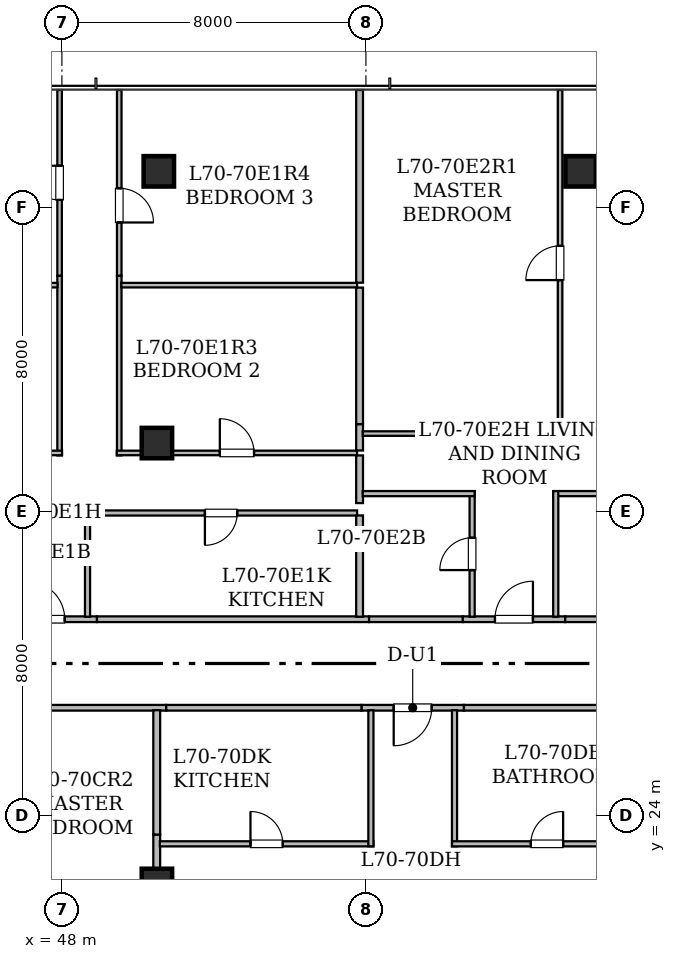
"""IFC4 building model, lengths in metres.
Left out: names, types, materials, properties, quantities, classifications, styles, units other than length and angle.
Written with IfcOpenShell. Run it as: python <this file> out.ifc"""

import sys

from ifc_helpers import new_model, si_unit, direction, frame, frame_2d, origin, origin_2d, place, context, subcontext, project, spatial, rectangle, hollow_rectangle, extrude, element, fill, save


model = new_model("IFC4")
c1 = context("Model", 3, precision=1e-05, world=origin(), true_north=direction((0.0, 1.0)))
c2 = subcontext(c1, "Body", "Model", "MODEL_VIEW")
j1 = project(units=[si_unit("LENGTHUNIT", "METRE"), si_unit("PLANEANGLEUNIT", "RADIAN")], contexts=[c1])
p1 = place(None, origin())
s1 = spatial("IfcSite", under=j1, at=p1, CompositionType="ELEMENT")
p2 = place(p1, origin())
s2 = spatial("IfcBuilding", under=s1, at=p2, CompositionType="ELEMENT")
p3 = place(p2, frame((0.0, 0.0, 273.65)))
s3 = spatial("IfcBuildingStorey", under=s2, at=p3, CompositionType="ELEMENT", Elevation=273.65)
for number, where, z_axis, x_axis in (
    (1, (50.55, 40.95, 0.0), (0.0, 0.0, 1.0), (1.0, 0.0, 0.0)),
    (2, (61.65, 40.95, 0.0), (0.0, 0.0, 1.0), (1.0, 0.0, 0.0)),
):
    element("IfcColumn", number, at=place(p3, frame(where, z_axis=z_axis, x_axis=x_axis)), inside=s3, PredefinedType="COLUMN", context=c2, shape_type="SweptSolid", body=[
        extrude(hollow_rectangle(XDim=0.8, YDim=0.8, WallThickness=0.04, at=origin_2d()), origin(), (0.0, 0.0, 1.0), 4.175),
    ])
for number, where, z_axis, x_axis in (
    (3, (50.5, 22.2, 0.0), (0.0, 0.0, 1.0), (1.0, 0.0, 0.0)),
    (4, (50.5, 33.8, 0.0), (0.0, 0.0, 1.0), (1.0, 0.0, 0.0)),
):
    element("IfcColumn", number, at=place(p3, frame(where, z_axis=z_axis, x_axis=x_axis)), inside=s3, PredefinedType="COLUMN", context=c2, shape_type="SweptSolid", body=[
        extrude(hollow_rectangle(XDim=0.8, YDim=0.8, WallThickness=0.04, at=origin_2d()), origin(), (0.0, 0.0, 1.0), 4.2),
    ])
p4 = place(p3, frame((50.744, 26.835, 0.0), z_axis=(0.0, 0.0, 1.0), x_axis=(-1.0, 0.0, 0.0)))
e5 = element("IfcWall", 5, at=p4, inside=s3, PredefinedType="STANDARD", context=c2, shape_type="SweptSolid", body=[
    extrude(rectangle(XDim=4.77, YDim=0.15, at=frame_2d((2.385, 0.0))), origin(), (0.0, 0.0, 1.0), 2.22),
])
p5 = place(p3, frame((58.58, 26.835, 0.0), z_axis=(0.0, 0.0, 1.0), x_axis=(-1.0, 0.0, 0.0)))
e6 = element("IfcWall", 6, at=p5, inside=s3, PredefinedType="STANDARD", context=c2, shape_type="SweptSolid", body=[
    extrude(rectangle(XDim=2.698, YDim=0.15, at=frame_2d((1.349, 0.0))), origin(), (0.0, 0.0, 1.0), 3.78),
])
p6 = place(p5, frame((0.849, 0.0, 0.0)))
e7 = element("IfcOpeningElement", 7, at=p6, cuts=e6, PredefinedType="OPENING", context=c2, shape_type="SweptSolid", body=[
    extrude(rectangle(XDim=1.0, YDim=2.15, at=frame_2d((0.5, 1.075))), frame((0.0, 0.085, 0.0), z_axis=(0.0, -1.0, 0.0), x_axis=(1.0, 0.0, 0.0)), (0.0, 0.0, 1.0), 0.17),
])
p7 = place(p3, frame((62.947, 26.835, 0.0), z_axis=(0.0, 0.0, 1.0), x_axis=(-1.0, 0.0, 0.0)))
e8 = element("IfcWall", 8, at=p7, inside=s3, PredefinedType="STANDARD", context=c2, shape_type="SweptSolid", body=[
    extrude(rectangle(XDim=4.367, YDim=0.15, at=frame_2d((2.184, 0.0))), origin(), (0.0, 0.0, 1.0), 3.78),
])
p8 = place(p3, frame((55.882, 26.835, 0.0), z_axis=(0.0, 0.0, 1.0), x_axis=(-1.0, 0.0, 0.0)))
e9 = element("IfcWall", 9, at=p8, inside=s3, PredefinedType="STANDARD", context=c2, shape_type="SweptSolid", body=[
    extrude(rectangle(XDim=5.138, YDim=0.15, at=frame_2d((2.569, 0.0))), origin(), (0.0, 0.0, 1.0), 2.22),
])
p9 = place(p3, frame((46.225, 29.165, 0.0), z_axis=(0.0, 0.0, 1.0), x_axis=(1.0, 0.0, 0.0)))
e10 = element("IfcWall", 10, at=p9, inside=s3, PredefinedType="STANDARD", context=c2, shape_type="SweptSolid", body=[
    extrude(rectangle(XDim=2.698, YDim=0.15, at=frame_2d((1.349, 0.0))), origin(), (0.0, 0.0, 1.0), 3.78),
])
p10 = place(p9, frame((0.849, 0.0, 0.0)))
e11 = element("IfcOpeningElement", 11, at=p10, cuts=e10, PredefinedType="OPENING", context=c2, shape_type="SweptSolid", body=[
    extrude(rectangle(XDim=1.0, YDim=2.15, at=frame_2d((0.5, 1.075))), frame((0.0, 0.085, 0.0), z_axis=(0.0, -1.0, 0.0), x_axis=(1.0, 0.0, 0.0)), (0.0, 0.0, 1.0), 0.17),
])
p11 = place(p3, frame((48.923, 29.165, 0.0), z_axis=(0.0, 0.0, 1.0), x_axis=(1.0, 0.0, 0.0)))
e12 = element("IfcWall", 12, at=p11, inside=s3, PredefinedType="STANDARD", context=c2, shape_type="SweptSolid", body=[
    extrude(rectangle(XDim=7.16, YDim=0.15, at=frame_2d((3.58, 0.0))), origin(), (0.0, 0.0, 1.0), 2.22),
])
p12 = place(p3, frame((58.546, 29.165, 0.0), z_axis=(0.0, 0.0, 1.0), x_axis=(1.0, 0.0, 0.0)))
e13 = element("IfcWall", 13, at=p12, inside=s3, PredefinedType="STANDARD", context=c2, shape_type="SweptSolid", body=[
    extrude(rectangle(XDim=2.698, YDim=0.15, at=frame_2d((1.349, 0.0))), origin(), (0.0, 0.0, 1.0), 3.78),
])
p13 = place(p12, frame((0.849, 0.0, 0.0)))
e14 = element("IfcOpeningElement", 14, at=p13, cuts=e13, PredefinedType="OPENING", context=c2, shape_type="SweptSolid", body=[
    extrude(rectangle(XDim=1.0, YDim=2.15, at=frame_2d((0.5, 1.075))), frame((0.0, 0.085, 0.0), z_axis=(0.0, -1.0, 0.0), x_axis=(1.0, 0.0, 0.0)), (0.0, 0.0, 1.0), 0.17),
])
p14 = place(p3, frame((56.083, 29.165, 0.0), z_axis=(0.0, 0.0, 1.0), x_axis=(1.0, 0.0, 0.0)))
e15 = element("IfcWall", 15, at=p14, inside=s3, PredefinedType="STANDARD", context=c2, shape_type="SweptSolid", body=[
    extrude(rectangle(XDim=2.463, YDim=0.15, at=frame_2d((1.231, 0.0))), origin(), (0.0, 0.0, 1.0), 3.78),
])
p15 = place(p3, frame((61.244, 29.165, 0.0), z_axis=(0.0, 0.0, 1.0), x_axis=(1.0, 0.0, 0.0)))
e16 = element("IfcWall", 16, at=p15, inside=s3, PredefinedType="STANDARD", context=c2, shape_type="SweptSolid", body=[
    extrude(rectangle(XDim=2.446, YDim=0.15, at=frame_2d((1.223, 0.0))), origin(), (0.0, 0.0, 1.0), 3.78),
])
p16 = place(p3, frame((50.495, 23.499, 0.0), z_axis=(0.0, 0.0, 1.0), x_axis=(0.0, -1.0, 0.0)))
e17 = element("IfcWall", 17, at=p16, inside=s3, PredefinedType="STANDARD", context=c2, shape_type="SweptSolid", body=[
    extrude(rectangle(XDim=1.816, YDim=0.18, at=frame_2d((0.908, 0.0))), origin(), (0.0, 0.0, 1.0), 2.22),
])
p17 = place(p3, frame((50.495, 26.77, 0.0), z_axis=(0.0, 0.0, 1.0), x_axis=(0.0, -1.0, 0.0)))
e18 = element("IfcWall", 18, at=p17, inside=s3, PredefinedType="STANDARD", context=c2, shape_type="SweptSolid", body=[
    extrude(rectangle(XDim=3.271, YDim=0.18, at=frame_2d((1.635, 0.0))), origin(), (0.0, 0.0, 1.0), 2.22),
])
p18 = place(p3, frame((58.331, 26.77, 0.0), z_axis=(0.0, 0.0, 1.0), x_axis=(0.0, -1.0, 0.0)))
e19 = element("IfcWall", 19, at=p18, inside=s3, PredefinedType="PARTITIONING", context=c2, shape_type="SweptSolid", body=[
    extrude(rectangle(XDim=3.58, YDim=0.135, at=frame_2d((1.79, 0.0))), origin(), (0.0, 0.0, 1.0), 3.78),
])
p19 = place(p3, frame((58.266, 23.255, 0.0), z_axis=(0.0, 0.0, 1.0), x_axis=(1.0, 0.0, 0.0)))
e20 = element("IfcWall", 20, at=p19, inside=s3, PredefinedType="PARTITIONING", context=c2, shape_type="SweptSolid", body=[
    extrude(rectangle(XDim=4.995, YDim=0.135, at=frame_2d((2.498, 0.0))), origin(), (0.0, 0.0, 1.0), 3.78),
])
p20 = place(p19, frame((2.073, 0.0, 0.0)))
e21 = element("IfcOpeningElement", 21, at=p20, cuts=e20, PredefinedType="OPENING", context=c2, shape_type="SweptSolid", body=[
    extrude(rectangle(XDim=0.85, YDim=2.1, at=frame_2d((0.425, 1.05))), frame((0.0, 0.077, 0.0), z_axis=(0.0, -1.0, 0.0), x_axis=(1.0, 0.0, 0.0)), (0.0, 0.0, 1.0), 0.155),
])
p21 = place(p3, frame((50.577, 23.255, 0.0), z_axis=(0.0, 0.0, 1.0), x_axis=(1.0, 0.0, 0.0)))
e22 = element("IfcWall", 22, at=p21, inside=s3, PredefinedType="PARTITIONING", context=c2, shape_type="SweptSolid", body=[
    extrude(rectangle(XDim=5.619, YDim=0.135, at=frame_2d((2.81, 0.0))), origin(), (0.0, 0.0, 1.0), 2.22),
])
p22 = place(p21, frame((2.385, 0.0, 0.0)))
e23 = element("IfcOpeningElement", 23, at=p22, cuts=e22, PredefinedType="OPENING", context=c2, shape_type="SweptSolid", body=[
    extrude(rectangle(XDim=0.85, YDim=2.1, at=frame_2d((0.425, 1.05))), frame((0.0, 0.077, 0.0), z_axis=(0.0, -1.0, 0.0), x_axis=(1.0, 0.0, 0.0)), (0.0, 0.0, 1.0), 0.155),
])
p23 = place(p3, frame((56.131, 23.19, 0.0), z_axis=(0.0, 0.0, 1.0), x_axis=(0.0, 1.0, 0.0)))
e24 = element("IfcWall", 24, at=p23, inside=s3, PredefinedType="PARTITIONING", context=c2, shape_type="SweptSolid", body=[
    extrude(rectangle(XDim=3.58, YDim=0.135, at=frame_2d((1.79, 0.0))), origin(), (0.0, 0.0, 1.0), 3.78),
])
p24 = place(p3, frame((55.768, 31.96, 0.0), z_axis=(0.0, 0.0, 1.0), x_axis=(-1.0, 0.0, 0.0)))
e25 = element("IfcWall", 25, at=p24, inside=s3, PredefinedType="PARTITIONING", context=c2, shape_type="SweptSolid", body=[
    extrude(rectangle(XDim=7.159, YDim=0.135, at=frame_2d((3.58, 0.0))), origin(), (0.0, 0.0, 1.0), 2.22),
])
p25 = place(p24, frame((3.155, 0.0, 0.0)))
e26 = element("IfcOpeningElement", 26, at=p25, cuts=e25, PredefinedType="OPENING", context=c2, shape_type="SweptSolid", body=[
    extrude(rectangle(XDim=0.85, YDim=2.1, at=frame_2d((0.425, 1.05))), frame((0.0, 0.077, 0.0), z_axis=(0.0, -1.0, 0.0), x_axis=(1.0, 0.0, 0.0)), (0.0, 0.0, 1.0), 0.155),
])
p26 = place(p3, frame((48.674, 32.025, 0.0), z_axis=(0.0, 0.0, 1.0), x_axis=(0.0, -1.0, 0.0)))
e27 = element("IfcWall", 27, at=p26, inside=s3, PredefinedType="PARTITIONING", context=c2, shape_type="SweptSolid", body=[
    extrude(rectangle(XDim=2.795, YDim=0.135, at=frame_2d((1.397, 0.0))), origin(), (0.0, 0.0, 1.0), 3.78),
])
p27 = place(p3, frame((47.939, 33.475, 0.0), z_axis=(0.0, 0.0, 1.0), x_axis=(0.0, 1.0, 0.0)))
e28 = element("IfcWall", 28, at=p27, inside=s3, PredefinedType="PARTITIONING", context=c2, shape_type="SweptSolid", body=[
    extrude(rectangle(XDim=4.729, YDim=0.12, at=frame_2d((2.365, 0.0))), origin(), (0.0, 0.0, 1.0), 2.22),
])
p28 = place(p3, frame((41.682, 33.54, 0.0), z_axis=(0.0, 0.0, 1.0), x_axis=(1.0, 0.0, 0.0)))
e29 = element("IfcWall", 29, at=p28, inside=s3, PredefinedType="PARTITIONING", context=c2, shape_type="SweptSolid", body=[
    extrude(rectangle(XDim=6.322, YDim=0.12, at=frame_2d((3.161, 0.0))), origin(), (0.0, 0.0, 1.0), 3.78),
])
p29 = place(p28, frame((2.711, 0.0, 0.0)))
e30 = element("IfcOpeningElement", 30, at=p29, cuts=e29, PredefinedType="OPENING", context=c2, shape_type="SweptSolid", body=[
    extrude(rectangle(XDim=0.9, YDim=2.1, at=frame_2d((0.45, 1.05))), frame((0.0, 0.07, 0.0), z_axis=(0.0, -1.0, 0.0), x_axis=(1.0, 0.0, 0.0)), (0.0, 0.0, 1.0), 0.14),
])
p30 = place(p3, frame((47.939, 38.204, 0.0), z_axis=(0.0, 0.0, 1.0), x_axis=(0.0, 1.0, 0.0)))
e31 = element("IfcWall", 31, at=p30, inside=s3, PredefinedType="PARTITIONING", context=c2, shape_type="SweptSolid", body=[
    extrude(rectangle(XDim=4.886, YDim=0.12, at=frame_2d((2.443, 0.0))), origin(), (0.0, 0.0, 1.0), 2.22),
])
p31 = place(p30, frame((1.993, 0.0, 0.0)))
e32 = element("IfcOpeningElement", 32, at=p31, cuts=e31, PredefinedType="OPENING", context=c2, shape_type="SweptSolid", body=[
    extrude(rectangle(XDim=0.9, YDim=2.1, at=frame_2d((0.45, 1.05))), frame((0.0, 0.07, 0.0), z_axis=(0.0, -1.0, 0.0), x_axis=(1.0, 0.0, 0.0)), (0.0, 0.0, 1.0), 0.14),
])
p32 = place(p3, frame((49.509, 38.204, 0.0), z_axis=(0.0, 0.0, 1.0), x_axis=(0.0, -1.0, 0.0)))
e33 = element("IfcWall", 33, at=p32, inside=s3, PredefinedType="PARTITIONING", context=c2, shape_type="SweptSolid", body=[
    extrude(rectangle(XDim=4.729, YDim=0.12, at=frame_2d((2.365, 0.0))), origin(), (0.0, 0.0, 1.0), 2.22),
])
p33 = place(p3, frame((49.444, 33.54, 0.0), z_axis=(0.0, 0.0, 1.0), x_axis=(1.0, 0.0, 0.0)))
e34 = element("IfcWall", 34, at=p33, inside=s3, PredefinedType="PARTITIONING", context=c2, shape_type="SweptSolid", body=[
    extrude(rectangle(XDim=6.324, YDim=0.12, at=frame_2d((3.162, 0.0))), origin(), (0.0, 0.0, 1.0), 2.22),
])
p34 = place(p33, frame((2.712, 0.0, 0.0)))
e35 = element("IfcOpeningElement", 35, at=p34, cuts=e34, PredefinedType="OPENING", context=c2, shape_type="SweptSolid", body=[
    extrude(rectangle(XDim=0.9, YDim=2.1, at=frame_2d((0.45, 1.05))), frame((0.0, 0.07, 0.0), z_axis=(0.0, -1.0, 0.0), x_axis=(1.0, 0.0, 0.0)), (0.0, 0.0, 1.0), 0.14),
])
p35 = place(p3, frame((49.509, 43.09, 0.0), z_axis=(0.0, 0.0, 1.0), x_axis=(0.0, -1.0, 0.0)))
e36 = element("IfcWall", 36, at=p35, inside=s3, PredefinedType="PARTITIONING", context=c2, shape_type="SweptSolid", body=[
    extrude(rectangle(XDim=4.886, YDim=0.12, at=frame_2d((2.443, 0.0))), origin(), (0.0, 0.0, 1.0), 2.22),
])
p36 = place(p35, frame((2.586, 0.0, 0.0)))
e37 = element("IfcOpeningElement", 37, at=p36, cuts=e36, PredefinedType="OPENING", context=c2, shape_type="SweptSolid", body=[
    extrude(rectangle(XDim=0.9, YDim=2.1, at=frame_2d((0.45, 1.05))), frame((0.0, 0.07, 0.0), z_axis=(0.0, -1.0, 0.0), x_axis=(1.0, 0.0, 0.0)), (0.0, 0.0, 1.0), 0.14),
])
p37 = place(p3, frame((55.833, 33.475, 0.0), z_axis=(0.0, 0.0, 1.0), x_axis=(0.0, -1.0, 0.0)))
e38 = element("IfcWall", 38, at=p37, inside=s3, PredefinedType="STANDARD", context=c2, shape_type="SweptSolid", body=[
    extrude(rectangle(XDim=1.254, YDim=0.18, at=frame_2d((0.627, 0.0))), origin(), (0.0, 0.0, 1.0), 2.22),
])
p38 = place(p3, frame((55.833, 31.895, 0.0), z_axis=(0.0, 0.0, 1.0), x_axis=(0.0, -1.0, 0.0)))
e39 = element("IfcWall", 39, at=p38, inside=s3, PredefinedType="STANDARD", context=c2, shape_type="SweptSolid", body=[
    extrude(rectangle(XDim=2.665, YDim=0.18, at=frame_2d((1.333, 0.0))), origin(), (0.0, 0.0, 1.0), 3.78),
])
p39 = place(p3, frame((41.682, 37.955, 0.0), z_axis=(0.0, 0.0, 1.0), x_axis=(1.0, 0.0, 0.0)))
e40 = element("IfcWall", 40, at=p39, inside=s3, PredefinedType="PARTITIONING", context=c2, shape_type="SweptSolid", body=[
    extrude(rectangle(XDim=6.203, YDim=0.12, at=frame_2d((3.102, 0.0))), origin(), (0.0, 0.0, 1.0), 3.78),
])
p40 = place(p3, frame((49.563, 37.955, 0.0), z_axis=(0.0, 0.0, 1.0), x_axis=(1.0, 0.0, 0.0)))
e41 = element("IfcWall", 41, at=p40, inside=s3, PredefinedType="PARTITIONING", context=c2, shape_type="SweptSolid", body=[
    extrude(rectangle(XDim=6.205, YDim=0.12, at=frame_2d((3.103, 0.0))), origin(), (0.0, 0.0, 1.0), 2.22),
])
p41 = place(p3, frame((55.833, 34.299, 0.0), z_axis=(0.0, 0.0, 1.0), x_axis=(0.0, -1.0, 0.0)))
e42 = element("IfcWall", 42, at=p41, inside=s3, PredefinedType="STANDARD", context=c2, shape_type="SweptSolid", body=[
    extrude(rectangle(XDim=0.694, YDim=0.18, at=frame_2d((0.347, 0.0))), origin(), (0.0, 0.0, 1.0), 2.22),
])
p42 = place(p3, frame((55.833, 37.89, 0.0), z_axis=(0.0, 0.0, 1.0), x_axis=(0.0, -1.0, 0.0)))
e43 = element("IfcWall", 43, at=p42, inside=s3, PredefinedType="STANDARD", context=c2, shape_type="SweptSolid", body=[
    extrude(rectangle(XDim=3.591, YDim=0.18, at=frame_2d((1.795, 0.0))), origin(), (0.0, 0.0, 1.0), 2.22),
])
p43 = place(p3, frame((55.833, 43.09, 0.0), z_axis=(0.0, 0.0, 1.0), x_axis=(0.0, -1.0, 0.0)))
e44 = element("IfcWall", 44, at=p43, inside=s3, PredefinedType="STANDARD", context=c2, shape_type="SweptSolid", body=[
    extrude(rectangle(XDim=5.07, YDim=0.18, at=frame_2d((2.535, 0.0))), origin(), (0.0, 0.0, 1.0), 2.22),
])
p44 = place(p3, frame((58.795, 29.23, 0.0), z_axis=(0.0, 0.0, 1.0), x_axis=(0.0, 1.0, 0.0)))
e45 = element("IfcWall", 45, at=p44, inside=s3, PredefinedType="PARTITIONING", context=c2, shape_type="SweptSolid", body=[
    extrude(rectangle(XDim=3.305, YDim=0.135, at=frame_2d((1.652, 0.0))), origin(), (0.0, 0.0, 1.0), 3.78),
])
p45 = place(p44, frame((1.228, 0.0, 0.0)))
e46 = element("IfcOpeningElement", 46, at=p45, cuts=e45, PredefinedType="OPENING", context=c2, shape_type="SweptSolid", body=[
    extrude(rectangle(XDim=0.85, YDim=2.1, at=frame_2d((0.425, 1.05))), frame((0.0, 0.077, 0.0), z_axis=(0.0, -1.0, 0.0), x_axis=(1.0, 0.0, 0.0)), (0.0, 0.0, 1.0), 0.155),
])
p46 = place(p3, frame((58.86, 32.47, 0.0), z_axis=(0.0, 0.0, 1.0), x_axis=(-1.0, 0.0, 0.0)))
e47 = element("IfcWall", 47, at=p46, inside=s3, PredefinedType="PARTITIONING", context=c2, shape_type="SweptSolid", body=[
    extrude(rectangle(XDim=2.945, YDim=0.135, at=frame_2d((1.473, 0.0))), origin(), (0.0, 0.0, 1.0), 3.78),
])
p47 = place(p3, frame((67.808, 32.47, 0.0), z_axis=(0.0, 0.0, 1.0), x_axis=(-1.0, 0.0, 0.0)))
e48 = element("IfcWall", 48, at=p47, inside=s3, PredefinedType="PARTITIONING", context=c2, shape_type="SweptSolid", body=[
    extrude(rectangle(XDim=6.878, YDim=0.135, at=frame_2d((3.439, 0.0))), origin(), (0.0, 0.0, 1.0), 2.22),
])
p48 = place(p47, frame((3.014, 0.0, 0.0)))
e49 = element("IfcOpeningElement", 49, at=p48, cuts=e48, PredefinedType="OPENING", context=c2, shape_type="SweptSolid", body=[
    extrude(rectangle(XDim=0.85, YDim=2.1, at=frame_2d((0.425, 1.05))), frame((0.0, 0.077, 0.0), z_axis=(0.0, -1.0, 0.0), x_axis=(1.0, 0.0, 0.0)), (0.0, 0.0, 1.0), 0.155),
])
p49 = place(p3, frame((60.995, 32.535, 0.0), z_axis=(0.0, 0.0, 1.0), x_axis=(0.0, -1.0, 0.0)))
e50 = element("IfcWall", 50, at=p49, inside=s3, PredefinedType="PARTITIONING", context=c2, shape_type="SweptSolid", body=[
    extrude(rectangle(XDim=3.305, YDim=0.135, at=frame_2d((1.652, 0.0))), origin(), (0.0, 0.0, 1.0), 3.78),
])
p50 = place(p3, frame((55.915, 34.05, 0.0), z_axis=(0.0, 0.0, 1.0), x_axis=(1.0, 0.0, 0.0)))
e51 = element("IfcWall", 51, at=p50, inside=s3, PredefinedType="PARTITIONING", context=c2, shape_type="SweptSolid", body=[
    extrude(rectangle(XDim=5.259, YDim=0.12, at=frame_2d((2.629, 0.0))), origin(), (0.0, 0.0, 1.0), 2.22),
])
p51 = place(p3, frame((61.109, 33.985, 0.0), z_axis=(0.0, 0.0, 1.0), x_axis=(0.0, 1.0, 0.0)))
e52 = element("IfcWall", 52, at=p51, inside=s3, PredefinedType="PARTITIONING", context=c2, shape_type="SweptSolid", body=[
    extrude(rectangle(XDim=9.105, YDim=0.12, at=frame_2d((4.552, 0.0))), origin(), (0.0, 0.0, 1.0), 2.22),
])
p52 = place(p51, frame((4.103, 0.0, 0.0)))
e53 = element("IfcOpeningElement", 53, at=p52, cuts=e52, PredefinedType="OPENING", context=c2, shape_type="SweptSolid", body=[
    extrude(rectangle(XDim=0.9, YDim=2.1, at=frame_2d((0.45, 1.05))), frame((0.0, 0.07, 0.0), z_axis=(0.0, -1.0, 0.0), x_axis=(1.0, 0.0, 0.0)), (0.0, 0.0, 1.0), 0.14),
])
p53 = place(p6, origin())
e54 = element("IfcDoor", 54, at=p53, inside=s3, OperationType="SINGLE_SWING_RIGHT", PredefinedType="DOOR", context=c2, shape_type="SweptSolid", body=[
    extrude(rectangle(XDim=1.0, YDim=2.15, at=frame_2d((0.5, 1.075))), frame((0.0, 0.025, 0.0), z_axis=(0.0, -1.0, 0.0), x_axis=(1.0, 0.0, 0.0)), (0.0, 0.0, 1.0), 0.05),
])
fill(e7, e54)
p54 = place(p10, origin())
e55 = element("IfcDoor", 55, at=p54, inside=s3, OperationType="SINGLE_SWING_LEFT", PredefinedType="DOOR", context=c2, shape_type="SweptSolid", body=[
    extrude(rectangle(XDim=1.0, YDim=2.15, at=frame_2d((0.5, 1.075))), frame((0.0, 0.025, 0.0), z_axis=(0.0, -1.0, 0.0), x_axis=(1.0, 0.0, 0.0)), (0.0, 0.0, 1.0), 0.05),
])
fill(e11, e55)
p55 = place(p13, origin())
e56 = element("IfcDoor", 56, at=p55, inside=s3, OperationType="SINGLE_SWING_RIGHT", PredefinedType="DOOR", context=c2, shape_type="SweptSolid", body=[
    extrude(rectangle(XDim=1.0, YDim=2.15, at=frame_2d((0.5, 1.075))), frame((0.0, 0.025, 0.0), z_axis=(0.0, -1.0, 0.0), x_axis=(1.0, 0.0, 0.0)), (0.0, 0.0, 1.0), 0.05),
])
fill(e14, e56)
p56 = place(p20, origin())
e57 = element("IfcDoor", 57, at=p56, inside=s3, OperationType="SINGLE_SWING_RIGHT", PredefinedType="DOOR", context=c2, shape_type="SweptSolid", body=[
    extrude(rectangle(XDim=0.85, YDim=2.1, at=frame_2d((0.425, 1.05))), frame((0.0, 0.025, 0.0), z_axis=(0.0, -1.0, 0.0), x_axis=(1.0, 0.0, 0.0)), (0.0, 0.0, 1.0), 0.05),
])
fill(e21, e57)
p57 = place(p22, origin())
e58 = element("IfcDoor", 58, at=p57, inside=s3, OperationType="SINGLE_SWING_LEFT", PredefinedType="DOOR", context=c2, shape_type="SweptSolid", body=[
    extrude(rectangle(XDim=0.85, YDim=2.1, at=frame_2d((0.425, 1.05))), frame((0.0, 0.025, 0.0), z_axis=(0.0, -1.0, 0.0), x_axis=(1.0, 0.0, 0.0)), (0.0, 0.0, 1.0), 0.05),
])
fill(e23, e58)
p58 = place(p25, origin())
e59 = element("IfcDoor", 59, at=p58, inside=s3, OperationType="SINGLE_SWING_RIGHT", PredefinedType="DOOR", context=c2, shape_type="SweptSolid", body=[
    extrude(rectangle(XDim=0.85, YDim=2.1, at=frame_2d((0.425, 1.05))), frame((0.0, 0.025, 0.0), z_axis=(0.0, -1.0, 0.0), x_axis=(1.0, 0.0, 0.0)), (0.0, 0.0, 1.0), 0.05),
])
fill(e26, e59)
p59 = place(p31, origin())
e60 = element("IfcDoor", 60, at=p59, inside=s3, OperationType="SINGLE_SWING_RIGHT", PredefinedType="DOOR", context=c2, shape_type="SweptSolid", body=[
    extrude(rectangle(XDim=0.9, YDim=2.1, at=frame_2d((0.45, 1.05))), frame((0.0, 0.025, 0.0), z_axis=(0.0, -1.0, 0.0), x_axis=(1.0, 0.0, 0.0)), (0.0, 0.0, 1.0), 0.05),
])
fill(e32, e60)
p60 = place(p34, origin())
e61 = element("IfcDoor", 61, at=p60, inside=s3, OperationType="SINGLE_SWING_LEFT", PredefinedType="DOOR", context=c2, shape_type="SweptSolid", body=[
    extrude(rectangle(XDim=0.9, YDim=2.1, at=frame_2d((0.45, 1.05))), frame((0.0, 0.025, 0.0), z_axis=(0.0, -1.0, 0.0), x_axis=(1.0, 0.0, 0.0)), (0.0, 0.0, 1.0), 0.05),
])
fill(e35, e61)
p61 = place(p36, origin())
e62 = element("IfcDoor", 62, at=p61, inside=s3, OperationType="SINGLE_SWING_RIGHT", PredefinedType="DOOR", context=c2, shape_type="SweptSolid", body=[
    extrude(rectangle(XDim=0.9, YDim=2.1, at=frame_2d((0.45, 1.05))), frame((0.0, 0.025, 0.0), z_axis=(0.0, -1.0, 0.0), x_axis=(1.0, 0.0, 0.0)), (0.0, 0.0, 1.0), 0.05),
])
fill(e37, e62)
p62 = place(p45, origin())
e63 = element("IfcDoor", 63, at=p62, inside=s3, OperationType="SINGLE_SWING_LEFT", PredefinedType="DOOR", context=c2, shape_type="SweptSolid", body=[
    extrude(rectangle(XDim=0.85, YDim=2.1, at=frame_2d((0.425, 1.05))), frame((0.0, 0.025, 0.0), z_axis=(0.0, -1.0, 0.0), x_axis=(1.0, 0.0, 0.0)), (0.0, 0.0, 1.0), 0.05),
])
fill(e46, e63)
p63 = place(p52, origin())
e64 = element("IfcDoor", 64, at=p63, inside=s3, OperationType="SINGLE_SWING_LEFT", PredefinedType="DOOR", context=c2, shape_type="SweptSolid", body=[
    extrude(rectangle(XDim=0.9, YDim=2.1, at=frame_2d((0.45, 1.05))), frame((0.0, 0.025, 0.0), z_axis=(0.0, -1.0, 0.0), x_axis=(1.0, 0.0, 0.0)), (0.0, 0.0, 1.0), 0.05),
])
fill(e53, e64)
save(model, sys.argv[1])
